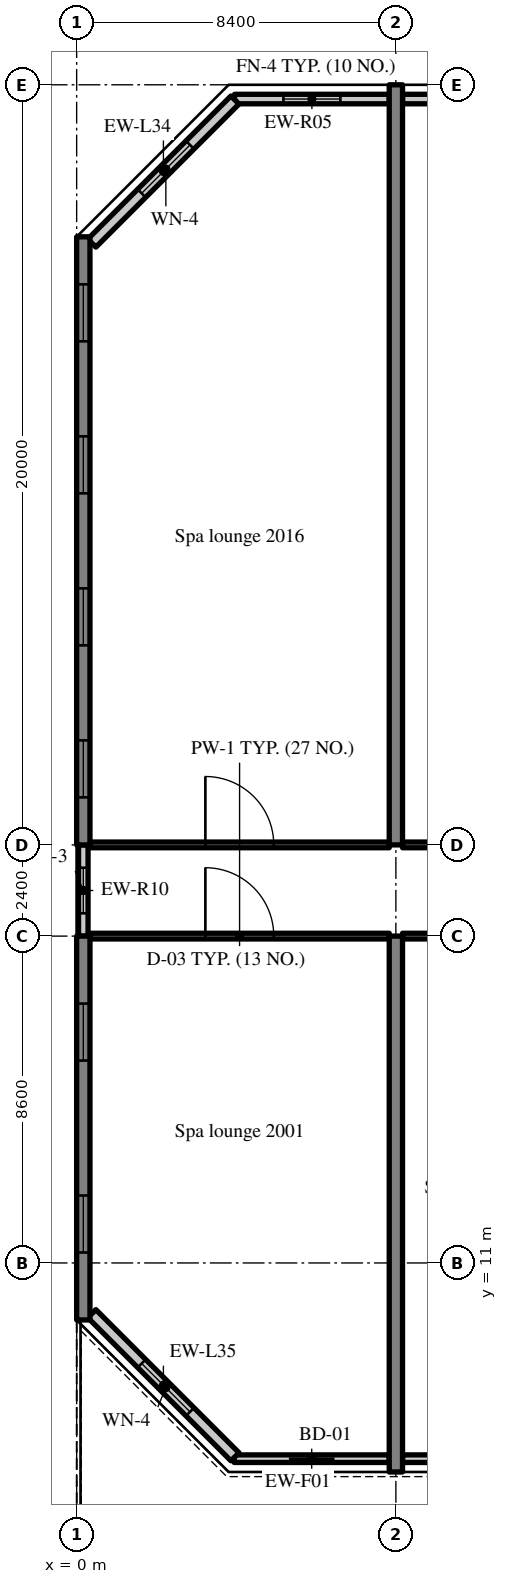
"""IFC4 building model, lengths in metres.
Left out: names, types, materials, properties, quantities, classifications, styles, units other than length and angle.
Written with IfcOpenShell. Run it as: python <this file> out.ifc"""

import sys

from ifc_helpers import new_model, si_unit, direction, frame, frame_2d, origin, place, context, subcontext, project, spatial, rectangle, extrude, source, transform, mapped, element, fill, save


model = new_model("IFC4")
c1 = context("Model", 3, precision=1e-05, world=origin(), true_north=direction((0.0, 1.0)))
c2 = subcontext(c1, "Body", "Model", "MODEL_VIEW")
j1 = project(units=[si_unit("LENGTHUNIT", "METRE"), si_unit("PLANEANGLEUNIT", "RADIAN")], contexts=[c1])
p1 = place(None, origin())
s1 = spatial("IfcSite", under=j1, at=p1, CompositionType="ELEMENT")
p2 = place(p1, origin())
s2 = spatial("IfcBuilding", under=s1, at=p2, CompositionType="ELEMENT")
p3 = place(p2, frame((0.0, 0.0, 86.4)))
s3 = spatial("IfcBuildingStorey", under=s2, at=p3, CompositionType="ELEMENT", Elevation=86.4)
m1 = source(origin(), c2, "Body", "SweptSolid", [
    extrude(rectangle(XDim=10.1, YDim=0.35, at=frame_2d((5.05, 0.0))), origin(), (0.0, 0.0, 1.0), 4.72),
])
p4 = place(p3, frame((0.175, 9.5, 0.0), z_axis=(0.0, 0.0, 1.0), x_axis=(0.0, 1.0, 0.0)))
e1 = element("IfcWall", 1, at=p4, inside=s3, PredefinedType="SHEAR", context=c2, shape_type="MappedRepresentation", body=[
    mapped(m1, transform((0.0, 0.0, 0.0), scale=1.0)),
])
m2 = source(origin(), c2, "Body", "SweptSolid", [
    extrude(rectangle(XDim=1.5, YDim=1.5, at=frame_2d((0.75, 0.75))), frame((0.0, 0.185, 0.0), z_axis=(0.0, -1.0, 0.0), x_axis=(1.0, 0.0, 0.0)), (0.0, 0.0, 1.0), 0.37),
])
p5 = place(p4, frame((1.775, 0.0, 0.9)))
e2 = element("IfcOpeningElement", 2, at=p5, cuts=e1, PredefinedType="OPENING", context=c2, shape_type="MappedRepresentation", body=[
    mapped(m2, transform((0.0, 0.0, 0.0), scale=1.0)),
])
p6 = place(p4, frame((6.825, 0.0, 0.9)))
e3 = element("IfcOpeningElement", 3, at=p6, cuts=e1, PredefinedType="OPENING", context=c2, shape_type="MappedRepresentation", body=[
    mapped(m2, transform((0.0, 0.0, 0.0), scale=1.0)),
])
m3 = source(origin(), c2, "Body", "SweptSolid", [
    extrude(rectangle(XDim=16.0, YDim=0.35, at=frame_2d((8.0, 0.0))), origin(), (0.0, 0.0, 1.0), 4.72),
])
p7 = place(p3, frame((0.175, 22.0, 0.0), z_axis=(0.0, 0.0, 1.0), x_axis=(0.0, 1.0, 0.0)))
e4 = element("IfcWall", 4, at=p7, inside=s3, PredefinedType="SHEAR", context=c2, shape_type="MappedRepresentation", body=[
    mapped(m3, transform((0.0, 0.0, 0.0), scale=1.0)),
])
p8 = place(p7, frame((1.25, 0.0, 0.9)))
e5 = element("IfcOpeningElement", 5, at=p8, cuts=e4, PredefinedType="OPENING", context=c2, shape_type="MappedRepresentation", body=[
    mapped(m2, transform((0.0, 0.0, 0.0), scale=1.0)),
])
p9 = place(p7, frame((5.25, 0.0, 0.9)))
e6 = element("IfcOpeningElement", 6, at=p9, cuts=e4, PredefinedType="OPENING", context=c2, shape_type="MappedRepresentation", body=[
    mapped(m2, transform((0.0, 0.0, 0.0), scale=1.0)),
])
p10 = place(p7, frame((9.25, 0.0, 0.9)))
e7 = element("IfcOpeningElement", 7, at=p10, cuts=e4, PredefinedType="OPENING", context=c2, shape_type="MappedRepresentation", body=[
    mapped(m2, transform((0.0, 0.0, 0.0), scale=1.0)),
])
p11 = place(p7, frame((13.25, 0.0, 0.9)))
e8 = element("IfcOpeningElement", 8, at=p11, cuts=e4, PredefinedType="OPENING", context=c2, shape_type="MappedRepresentation", body=[
    mapped(m2, transform((0.0, 0.0, 0.0), scale=1.0)),
])
m4 = source(origin(), c2, "Body", "SweptSolid", [
    extrude(rectangle(XDim=14.1, YDim=0.35, at=frame_2d((7.05, 0.0))), origin(), (0.0, 0.0, 1.0), 4.72),
])
p12 = place(p3, frame((8.4, 5.5, 0.0), z_axis=(0.0, 0.0, 1.0), x_axis=(0.0, 1.0, 0.0)))
e9 = element("IfcWall", 9, at=p12, inside=s3, PredefinedType="SHEAR", context=c2, shape_type="MappedRepresentation", body=[
    mapped(m4, transform((0.0, 0.0, 0.0), scale=1.0)),
])
m5 = source(origin(), c2, "Body", "SweptSolid", [
    extrude(rectangle(XDim=20.0, YDim=0.35, at=frame_2d((10.0, 0.0))), origin(), (0.0, 0.0, 1.0), 4.72),
])
p13 = place(p3, frame((8.4, 22.0, 0.0), z_axis=(0.0, 0.0, 1.0), x_axis=(0.0, 1.0, 0.0)))
e10 = element("IfcWall", 10, at=p13, inside=s3, PredefinedType="SHEAR", context=c2, shape_type="MappedRepresentation", body=[
    mapped(m5, transform((0.0, 0.0, 0.0), scale=1.0)),
])
m6 = source(origin(), c2, "Body", "SweptSolid", [
    extrude(rectangle(XDim=4.08, YDim=0.2, at=frame_2d((2.04, 0.0))), origin(), (0.0, 0.0, 1.0), 4.02),
])
p14 = place(p3, frame((4.145, 5.85, 0.0), z_axis=(0.0, 0.0, 1.0), x_axis=(1.0, 0.0, 0.0)))
e11 = element("IfcWall", 11, at=p14, inside=s3, PredefinedType="SOLIDWALL", context=c2, shape_type="MappedRepresentation", body=[
    mapped(m6, transform((0.0, 0.0, 0.0), scale=1.0)),
])
m7 = source(origin(), c2, "Body", "SweptSolid", [
    extrude(rectangle(XDim=1.2, YDim=2.4, at=frame_2d((0.6, 1.2))), frame((0.0, 0.11, 0.0), z_axis=(0.0, -1.0, 0.0), x_axis=(1.0, 0.0, 0.0)), (0.0, 0.0, 1.0), 0.22),
])
p15 = place(p14, frame((1.44, 0.0, 0.0)))
e12 = element("IfcOpeningElement", 12, at=p15, cuts=e11, PredefinedType="OPENING", context=c2, shape_type="MappedRepresentation", body=[
    mapped(m7, transform((0.0, 0.0, 0.0), scale=1.0)),
])
m8 = source(origin(), c2, "Body", "SweptSolid", [
    extrude(rectangle(XDim=8.05, YDim=0.2, at=frame_2d((4.025, 0.0))), origin(), (0.0, 0.0, 1.0), 4.02),
])
p16 = place(p3, frame((8.575, 5.85, 0.0), z_axis=(0.0, 0.0, 1.0), x_axis=(1.0, 0.0, 0.0)))
e13 = element("IfcWall", 13, at=p16, inside=s3, PredefinedType="SOLIDWALL", context=c2, shape_type="MappedRepresentation", body=[
    mapped(m8, transform((0.0, 0.0, 0.0), scale=1.0)),
])
m9 = source(origin(), c2, "Body", "SweptSolid", [
    extrude(rectangle(XDim=1.5, YDim=1.5, at=frame_2d((0.75, 0.75))), frame((0.0, 0.11, 0.0), z_axis=(0.0, -1.0, 0.0), x_axis=(1.0, 0.0, 0.0)), (0.0, 0.0, 1.0), 0.22),
])
p17 = place(p16, frame((5.288, 0.0, 0.9)))
e14 = element("IfcOpeningElement", 14, at=p17, cuts=e13, PredefinedType="OPENING", context=c2, shape_type="MappedRepresentation", body=[
    mapped(m9, transform((0.0, 0.0, 0.0), scale=1.0)),
])
p18 = place(p16, frame((1.413, 0.0, 0.0)))
e15 = element("IfcOpeningElement", 15, at=p18, cuts=e13, PredefinedType="OPENING", context=c2, shape_type="MappedRepresentation", body=[
    mapped(m7, transform((0.0, 0.0, 0.0), scale=1.0)),
])
m10 = source(origin(), c2, "Body", "SweptSolid", [
    extrude(rectangle(XDim=4.07, YDim=0.25, at=frame_2d((2.035, 0.0))), origin(), (0.0, 0.0, 1.0), 4.02),
])
p19 = place(p3, frame((8.225, 41.625, 0.0), z_axis=(0.0, 0.0, 1.0), x_axis=(-1.0, 0.0, 0.0)))
e16 = element("IfcWall", 16, at=p19, inside=s3, PredefinedType="SOLIDWALL", context=c2, shape_type="MappedRepresentation", body=[
    mapped(m10, transform((0.0, 0.0, 0.0), scale=1.0)),
])
m11 = source(origin(), c2, "Body", "SweptSolid", [
    extrude(rectangle(XDim=1.5, YDim=1.5, at=frame_2d((0.75, 0.75))), frame((0.0, 0.135, 0.0), z_axis=(0.0, -1.0, 0.0), x_axis=(1.0, 0.0, 0.0)), (0.0, 0.0, 1.0), 0.27),
])
p20 = place(p19, frame((1.285, 0.0, 0.9)))
e17 = element("IfcOpeningElement", 17, at=p20, cuts=e16, PredefinedType="OPENING", context=c2, shape_type="MappedRepresentation", body=[
    mapped(m11, transform((0.0, 0.0, 0.0), scale=1.0)),
])
m12 = source(origin(), c2, "Body", "SweptSolid", [
    extrude(rectangle(XDim=3.675, YDim=0.25, at=frame_2d((1.837, 0.0))), origin(), (0.0, 0.0, 1.0), 4.02),
])
p21 = place(p3, frame((12.25, 41.625, 0.0), z_axis=(0.0, 0.0, 1.0), x_axis=(-1.0, 0.0, 0.0)))
e18 = element("IfcWall", 18, at=p21, inside=s3, PredefinedType="SOLIDWALL", context=c2, shape_type="MappedRepresentation", body=[
    mapped(m12, transform((0.0, 0.0, 0.0), scale=1.0)),
])
p22 = place(p21, frame((1.087, 0.0, 0.9)))
e19 = element("IfcOpeningElement", 19, at=p22, cuts=e18, PredefinedType="OPENING", context=c2, shape_type="MappedRepresentation", body=[
    mapped(m11, transform((0.0, 0.0, 0.0), scale=1.0)),
])
m13 = source(origin(), c2, "Body", "SweptSolid", [
    extrude(rectangle(XDim=5.326, YDim=0.3, at=frame_2d((2.663, 0.0))), origin(), (0.0, 0.0, 1.0), 4.72),
])
p23 = place(p3, frame((4.166, 41.6, 0.0), z_axis=(0.0, 0.0, 1.0), x_axis=(-0.707106781187, -0.707106781187, 0.0)))
e20 = element("IfcWall", 20, at=p23, inside=s3, PredefinedType="SOLIDWALL", context=c2, shape_type="MappedRepresentation", body=[
    mapped(m13, transform((0.0, 0.0, 0.0), scale=1.0)),
])
m14 = source(origin(), c2, "Body", "SweptSolid", [
    extrude(rectangle(XDim=1.8, YDim=1.5, at=frame_2d((0.9, 0.75))), frame((0.0, 0.16, 0.0), z_axis=(0.0, -1.0, 0.0), x_axis=(1.0, 0.0, 0.0)), (0.0, 0.0, 1.0), 0.32),
])
p24 = place(p23, frame((1.672, 0.0, 0.9)))
e21 = element("IfcOpeningElement", 21, at=p24, cuts=e20, PredefinedType="OPENING", context=c2, shape_type="MappedRepresentation", body=[
    mapped(m14, transform((0.0, 0.0, 0.0), scale=1.0)),
])
p25 = place(p3, frame((0.4, 9.666, 0.0), z_axis=(0.0, 0.0, 1.0), x_axis=(0.707106781187, -0.707106781187, 0.0)))
e22 = element("IfcWall", 22, at=p25, inside=s3, PredefinedType="SOLIDWALL", context=c2, shape_type="MappedRepresentation", body=[
    mapped(m13, transform((0.0, 0.0, 0.0), scale=1.0)),
])
p26 = place(p25, frame((1.854, 0.0, 0.9)))
e23 = element("IfcOpeningElement", 23, at=p26, cuts=e22, PredefinedType="OPENING", context=c2, shape_type="MappedRepresentation", body=[
    mapped(m14, transform((0.0, 0.0, 0.0), scale=1.0)),
])
m15 = source(origin(), c2, "Body", "SweptSolid", [
    extrude(rectangle(XDim=2.4, YDim=0.25, at=frame_2d((1.2, 0.0))), origin(), (0.0, 0.0, 1.0), 3.82),
])
p27 = place(p3, frame((0.175, 19.6, 0.0), z_axis=(0.0, 0.0, 1.0), x_axis=(0.0, 1.0, 0.0)))
e24 = element("IfcWall", 24, at=p27, inside=s3, PredefinedType="SOLIDWALL", context=c2, shape_type="MappedRepresentation", body=[
    mapped(m15, transform((0.0, 0.0, 0.0), scale=1.0)),
])
m16 = source(origin(), c2, "Body", "SweptSolid", [
    extrude(rectangle(XDim=1.2, YDim=1.5, at=frame_2d((0.6, 0.75))), frame((0.0, 0.135, 0.0), z_axis=(0.0, -1.0, 0.0), x_axis=(1.0, 0.0, 0.0)), (0.0, 0.0, 1.0), 0.27),
])
p28 = place(p27, frame((0.6, 0.0, 0.9)))
e25 = element("IfcOpeningElement", 25, at=p28, cuts=e24, PredefinedType="OPENING", context=c2, shape_type="MappedRepresentation", body=[
    mapped(m16, transform((0.0, 0.0, 0.0), scale=1.0)),
])
m17 = source(origin(), c2, "Body", "SweptSolid", [
    extrude(rectangle(XDim=7.875, YDim=0.15, at=frame_2d((3.938, 0.0))), origin(), (0.0, 0.0, 1.0), 4.02),
])
p29 = place(p3, frame((0.35, 19.6, 0.0), z_axis=(0.0, 0.0, 1.0), x_axis=(1.0, 0.0, 0.0)))
e26 = element("IfcWall", 26, at=p29, inside=s3, PredefinedType="PARTITIONING", context=c2, shape_type="MappedRepresentation", body=[
    mapped(m17, transform((0.0, 0.0, 0.0), scale=1.0)),
])
m18 = source(origin(), c2, "Body", "SweptSolid", [
    extrude(rectangle(XDim=1.8, YDim=2.1, at=frame_2d((0.9, 1.05))), frame((0.0, 0.085, 0.0), z_axis=(0.0, -1.0, 0.0), x_axis=(1.0, 0.0, 0.0)), (0.0, 0.0, 1.0), 0.17),
])
p30 = place(p29, frame((3.037, 0.0, 0.0)))
e27 = element("IfcOpeningElement", 27, at=p30, cuts=e26, PredefinedType="OPENING", context=c2, shape_type="MappedRepresentation", body=[
    mapped(m18, transform((0.0, 0.0, 0.0), scale=1.0)),
])
m19 = source(origin(), c2, "Body", "SweptSolid", [
    extrude(rectangle(XDim=3.95, YDim=0.15, at=frame_2d((1.975, 0.0))), origin(), (0.0, 0.0, 1.0), 4.02),
])
p31 = place(p3, frame((8.575, 19.6, 0.0), z_axis=(0.0, 0.0, 1.0), x_axis=(1.0, 0.0, 0.0)))
e28 = element("IfcWall", 28, at=p31, inside=s3, PredefinedType="PARTITIONING", context=c2, shape_type="MappedRepresentation", body=[
    mapped(m19, transform((0.0, 0.0, 0.0), scale=1.0)),
])
m20 = source(origin(), c2, "Body", "SweptSolid", [
    extrude(rectangle(XDim=1.0, YDim=2.1, at=frame_2d((0.5, 1.05))), frame((0.0, 0.085, 0.0), z_axis=(0.0, -1.0, 0.0), x_axis=(1.0, 0.0, 0.0)), (0.0, 0.0, 1.0), 0.17),
])
p32 = place(p31, frame((1.475, 0.0, 0.0)))
e29 = element("IfcOpeningElement", 29, at=p32, cuts=e28, PredefinedType="OPENING", context=c2, shape_type="MappedRepresentation", body=[
    mapped(m20, transform((0.0, 0.0, 0.0), scale=1.0)),
])
p33 = place(p3, frame((0.35, 22.0, 0.0), z_axis=(0.0, 0.0, 1.0), x_axis=(1.0, 0.0, 0.0)))
e30 = element("IfcWall", 30, at=p33, inside=s3, PredefinedType="PARTITIONING", context=c2, shape_type="MappedRepresentation", body=[
    mapped(m17, transform((0.0, 0.0, 0.0), scale=1.0)),
])
p34 = place(p33, frame((3.037, 0.0, 0.0)))
e31 = element("IfcOpeningElement", 31, at=p34, cuts=e30, PredefinedType="OPENING", context=c2, shape_type="MappedRepresentation", body=[
    mapped(m18, transform((0.0, 0.0, 0.0), scale=1.0)),
])
m21 = source(origin(), c2, "Body", "SweptSolid", [
    extrude(rectangle(XDim=8.05, YDim=0.15, at=frame_2d((4.025, 0.0))), origin(), (0.0, 0.0, 1.0), 4.02),
])
p35 = place(p3, frame((8.575, 22.0, 0.0), z_axis=(0.0, 0.0, 1.0), x_axis=(1.0, 0.0, 0.0)))
e32 = element("IfcWall", 32, at=p35, inside=s3, PredefinedType="PARTITIONING", context=c2, shape_type="MappedRepresentation", body=[
    mapped(m21, transform((0.0, 0.0, 0.0), scale=1.0)),
])
p36 = place(p35, frame((3.125, 0.0, 0.0)))
e33 = element("IfcOpeningElement", 33, at=p36, cuts=e32, PredefinedType="OPENING", context=c2, shape_type="MappedRepresentation", body=[
    mapped(m18, transform((0.0, 0.0, 0.0), scale=1.0)),
])
m22 = source(origin(), c2, "Body", "SweptSolid", [
    extrude(rectangle(XDim=1.5, YDim=1.5, at=frame_2d((0.75, 0.75))), frame((0.0, 0.03, 0.0), z_axis=(0.0, -1.0, 0.0), x_axis=(1.0, 0.0, 0.0)), (0.0, 0.0, 1.0), 0.06),
])
p37 = place(p20, origin())
e34 = element("IfcWindow", 34, at=p37, inside=s3, PartitioningType="SINGLE_PANEL", PredefinedType="WINDOW", context=c2, shape_type="MappedRepresentation", body=[
    mapped(m22, transform((0.0, 0.0, 0.0), scale=1.0)),
])
fill(e17, e34)
m23 = source(origin(), c2, "Body", "SweptSolid", [
    extrude(rectangle(XDim=1.8, YDim=1.5, at=frame_2d((0.9, 0.75))), frame((0.0, 0.03, 0.0), z_axis=(0.0, -1.0, 0.0), x_axis=(1.0, 0.0, 0.0)), (0.0, 0.0, 1.0), 0.06),
])
p38 = place(p24, origin())
e35 = element("IfcWindow", 35, at=p38, inside=s3, PartitioningType="SINGLE_PANEL", PredefinedType="WINDOW", context=c2, shape_type="MappedRepresentation", body=[
    mapped(m23, transform((0.0, 0.0, 0.0), scale=1.0)),
])
fill(e21, e35)
p39 = place(p26, origin())
e36 = element("IfcWindow", 36, at=p39, inside=s3, PartitioningType="SINGLE_PANEL", PredefinedType="WINDOW", context=c2, shape_type="MappedRepresentation", body=[
    mapped(m23, transform((0.0, 0.0, 0.0), scale=1.0)),
])
fill(e23, e36)
p40 = place(p5, origin())
e37 = element("IfcWindow", 37, at=p40, inside=s3, PartitioningType="SINGLE_PANEL", PredefinedType="WINDOW", context=c2, shape_type="MappedRepresentation", body=[
    mapped(m22, transform((0.0, 0.0, 0.0), scale=1.0)),
])
fill(e2, e37)
p41 = place(p6, origin())
e38 = element("IfcWindow", 38, at=p41, inside=s3, PartitioningType="SINGLE_PANEL", PredefinedType="WINDOW", context=c2, shape_type="MappedRepresentation", body=[
    mapped(m22, transform((0.0, 0.0, 0.0), scale=1.0)),
])
fill(e3, e38)
p42 = place(p8, origin())
e39 = element("IfcWindow", 39, at=p42, inside=s3, PartitioningType="SINGLE_PANEL", PredefinedType="WINDOW", context=c2, shape_type="MappedRepresentation", body=[
    mapped(m22, transform((0.0, 0.0, 0.0), scale=1.0)),
])
fill(e5, e39)
p43 = place(p9, origin())
e40 = element("IfcWindow", 40, at=p43, inside=s3, PartitioningType="SINGLE_PANEL", PredefinedType="WINDOW", context=c2, shape_type="MappedRepresentation", body=[
    mapped(m22, transform((0.0, 0.0, 0.0), scale=1.0)),
])
fill(e6, e40)
p44 = place(p10, origin())
e41 = element("IfcWindow", 41, at=p44, inside=s3, PartitioningType="SINGLE_PANEL", PredefinedType="WINDOW", context=c2, shape_type="MappedRepresentation", body=[
    mapped(m22, transform((0.0, 0.0, 0.0), scale=1.0)),
])
fill(e7, e41)
p45 = place(p11, origin())
e42 = element("IfcWindow", 42, at=p45, inside=s3, PartitioningType="SINGLE_PANEL", PredefinedType="WINDOW", context=c2, shape_type="MappedRepresentation", body=[
    mapped(m22, transform((0.0, 0.0, 0.0), scale=1.0)),
])
fill(e8, e42)
m24 = source(origin(), c2, "Body", "SweptSolid", [
    extrude(rectangle(XDim=1.2, YDim=1.5, at=frame_2d((0.6, 0.75))), frame((0.0, 0.03, 0.0), z_axis=(0.0, -1.0, 0.0), x_axis=(1.0, 0.0, 0.0)), (0.0, 0.0, 1.0), 0.06),
])
p46 = place(p28, origin())
e43 = element("IfcWindow", 43, at=p46, inside=s3, PartitioningType="SINGLE_PANEL", PredefinedType="WINDOW", context=c2, shape_type="MappedRepresentation", body=[
    mapped(m24, transform((0.0, 0.0, 0.0), scale=1.0)),
])
fill(e25, e43)
m25 = source(origin(), c2, "Body", "SweptSolid", [
    extrude(rectangle(XDim=1.2, YDim=2.4, at=frame_2d((0.6, 1.2))), frame((0.0, 0.025, 0.0), z_axis=(0.0, -1.0, 0.0), x_axis=(1.0, 0.0, 0.0)), (0.0, 0.0, 1.0), 0.05),
])
p47 = place(p15, origin())
e44 = element("IfcDoor", 44, at=p47, inside=s3, OperationType="SLIDING_TO_LEFT", PredefinedType="DOOR", context=c2, shape_type="MappedRepresentation", body=[
    mapped(m25, transform((0.0, 0.0, 0.0), scale=1.0)),
])
fill(e12, e44)
m26 = source(origin(), c2, "Body", "SweptSolid", [
    extrude(rectangle(XDim=1.8, YDim=2.1, at=frame_2d((0.9, 1.05))), frame((0.0, 0.025, 0.0), z_axis=(0.0, -1.0, 0.0), x_axis=(1.0, 0.0, 0.0)), (0.0, 0.0, 1.0), 0.05),
])
p48 = place(p30, origin())
e45 = element("IfcDoor", 45, at=p48, inside=s3, OperationType="DOUBLE_DOOR_SINGLE_SWING", PredefinedType="DOOR", context=c2, shape_type="MappedRepresentation", body=[
    mapped(m26, transform((0.0, 0.0, 0.0), scale=1.0)),
])
fill(e27, e45)
p49 = place(p34, origin())
e46 = element("IfcDoor", 46, at=p49, inside=s3, OperationType="DOUBLE_DOOR_SINGLE_SWING", PredefinedType="DOOR", context=c2, shape_type="MappedRepresentation", body=[
    mapped(m26, transform((0.0, 0.0, 0.0), scale=1.0)),
])
fill(e31, e46)
save(model, sys.argv[1])
